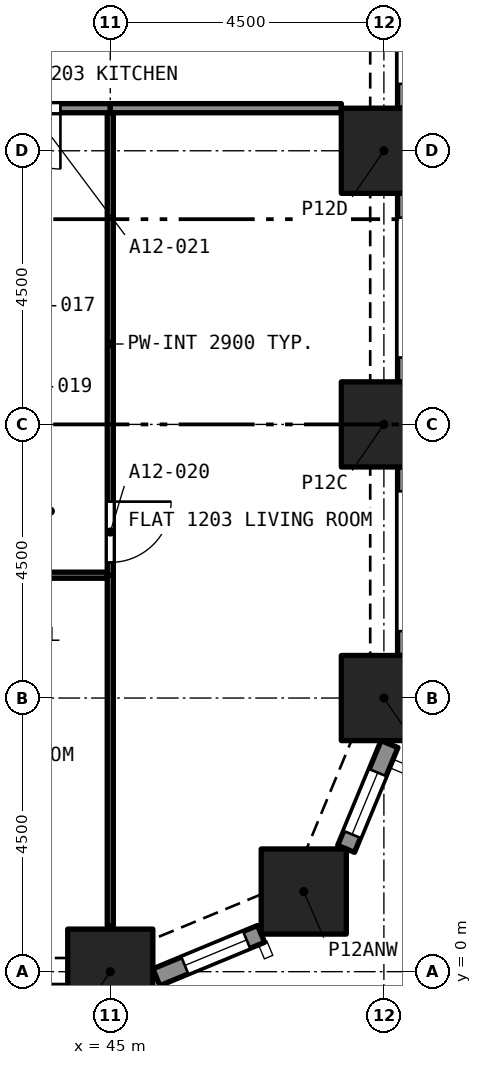
"""IFC4 building model, lengths in metres.
Left out: names, types, materials, properties, quantities, classifications, styles, units other than length and angle.
Written with IfcOpenShell. Run it as: python <this file> out.ifc"""

import sys

from ifc_helpers import new_model, si_unit, direction, frame, frame_2d, origin, origin_2d, place, context, subcontext, project, spatial, rectangle, extrude, element, fill, save


model = new_model("IFC4")
c1 = context("Model", 3, precision=1e-05, world=origin(), true_north=direction((0.0, 1.0)))
c2 = subcontext(c1, "Body", "Model", "MODEL_VIEW")
j1 = project(units=[si_unit("LENGTHUNIT", "METRE"), si_unit("PLANEANGLEUNIT", "RADIAN")], contexts=[c1])
p1 = place(None, origin())
s1 = spatial("IfcSite", under=j1, at=p1, CompositionType="ELEMENT")
p2 = place(p1, origin())
s2 = spatial("IfcBuilding", under=s1, at=p2, CompositionType="ELEMENT")
p3 = place(p2, frame((0.0, 0.0, 49.6)))
s3 = spatial("IfcBuildingStorey", under=s2, at=p3, CompositionType="ELEMENT", Elevation=49.6)
for number, where, z_axis, x_axis in (
    (1, (45.0, 0.0, 0.0), (0.0, 0.0, 1.0), (1.0, 0.0, 0.0)),
    (2, (48.182, 1.318, 0.0), (0.0, 0.0, 1.0), (1.0, 0.0, 0.0)),
    (3, (49.5, 4.5, 0.0), (0.0, 0.0, 1.0), (1.0, 0.0, 0.0)),
    (4, (49.5, 9.0, 0.0), (0.0, 0.0, 1.0), (1.0, 0.0, 0.0)),
    (5, (49.5, 13.5, 0.0), (0.0, 0.0, 1.0), (1.0, 0.0, 0.0)),
):
    element("IfcColumn", number, at=place(p3, frame(where, z_axis=z_axis, x_axis=x_axis)), inside=s3, PredefinedType="COLUMN", context=c2, shape_type="SweptSolid", body=[
        extrude(rectangle(XDim=1.4, YDim=1.4, at=origin_2d()), origin(), (0.0, 0.0, 1.0), 3.2),
    ])
p4 = place(p3, frame((47.48, 0.622, 0.0), z_axis=(0.0, 0.0, 1.0), x_axis=(-0.923903565336, -0.38262540684, 0.0)))
e6 = element("IfcWall", 6, at=p4, inside=s3, PredefinedType="SOLIDWALL", context=c2, shape_type="SweptSolid", body=[
    extrude(rectangle(XDim=1.865, YDim=0.3, at=frame_2d((0.933, 0.0))), origin(), (0.0, 0.0, 1.0), 3.2),
])
p5 = place(p4, frame((0.258, 0.0, 0.45)))
e7 = element("IfcOpeningElement", 7, at=p5, cuts=e6, PredefinedType="OPENING", context=c2, shape_type="SweptSolid", body=[
    extrude(rectangle(XDim=1.1, YDim=1.95, at=frame_2d((0.55, 0.975))), frame((0.0, 0.16, 0.0), z_axis=(0.0, -1.0, 0.0), x_axis=(1.0, 0.0, 0.0)), (0.0, 0.0, 1.0), 0.32),
])
p6 = place(p3, frame((49.592, 3.743, 0.0), z_axis=(0.0, 0.0, 1.0), x_axis=(-0.382737135771, -0.923857286003, 0.0)))
e8 = element("IfcWall", 8, at=p6, inside=s3, PredefinedType="SOLIDWALL", context=c2, shape_type="SweptSolid", body=[
    extrude(rectangle(XDim=1.865, YDim=0.3, at=frame_2d((0.933, 0.0))), origin(), (0.0, 0.0, 1.0), 3.2),
])
p7 = place(p6, frame((0.508, 0.0, 0.45)))
e9 = element("IfcOpeningElement", 9, at=p7, cuts=e8, PredefinedType="OPENING", context=c2, shape_type="SweptSolid", body=[
    extrude(rectangle(XDim=1.1, YDim=1.95, at=frame_2d((0.55, 0.975))), frame((0.0, 0.16, 0.0), z_axis=(0.0, -1.0, 0.0), x_axis=(1.0, 0.0, 0.0)), (0.0, 0.0, 1.0), 0.32),
])
p8 = place(p3, frame((49.875, 8.3, 0.0), z_axis=(0.0, 0.0, 1.0), x_axis=(0.0, -1.0, 0.0)))
e10 = element("IfcWall", 10, at=p8, inside=s3, PredefinedType="SOLIDWALL", context=c2, shape_type="SweptSolid", body=[
    extrude(rectangle(XDim=3.1, YDim=0.3, at=frame_2d((1.55, 0.0))), origin(), (0.0, 0.0, 1.0), 3.2),
])
p9 = place(p8, frame((0.4, 0.0, 0.45)))
e11 = element("IfcOpeningElement", 11, at=p9, cuts=e10, PredefinedType="OPENING", context=c2, shape_type="SweptSolid", body=[
    extrude(rectangle(XDim=2.3, YDim=1.95, at=frame_2d((1.15, 0.975))), frame((0.0, 0.16, 0.0), z_axis=(0.0, -1.0, 0.0), x_axis=(1.0, 0.0, 0.0)), (0.0, 0.0, 1.0), 0.32),
])
p10 = place(p3, frame((49.875, 12.8, 0.0), z_axis=(0.0, 0.0, 1.0), x_axis=(0.0, -1.0, 0.0)))
e12 = element("IfcWall", 12, at=p10, inside=s3, PredefinedType="SOLIDWALL", context=c2, shape_type="SweptSolid", body=[
    extrude(rectangle(XDim=3.1, YDim=0.3, at=frame_2d((1.55, 0.0))), origin(), (0.0, 0.0, 1.0), 3.2),
])
p11 = place(p10, frame((0.4, 0.0, 0.45)))
e13 = element("IfcOpeningElement", 13, at=p11, cuts=e12, PredefinedType="OPENING", context=c2, shape_type="SweptSolid", body=[
    extrude(rectangle(XDim=2.3, YDim=1.95, at=frame_2d((1.15, 0.975))), frame((0.0, 0.16, 0.0), z_axis=(0.0, -1.0, 0.0), x_axis=(1.0, 0.0, 0.0)), (0.0, 0.0, 1.0), 0.32),
])
p12 = place(p3, frame((49.875, 17.3, 0.0), z_axis=(0.0, 0.0, 1.0), x_axis=(0.0, -1.0, 0.0)))
e14 = element("IfcWall", 14, at=p12, inside=s3, PredefinedType="SOLIDWALL", context=c2, shape_type="SweptSolid", body=[
    extrude(rectangle(XDim=3.1, YDim=0.3, at=frame_2d((1.55, 0.0))), origin(), (0.0, 0.0, 1.0), 3.2),
])
p13 = place(p12, frame((0.4, 0.0, 0.45)))
e15 = element("IfcOpeningElement", 15, at=p13, cuts=e14, PredefinedType="OPENING", context=c2, shape_type="SweptSolid", body=[
    extrude(rectangle(XDim=2.3, YDim=1.95, at=frame_2d((1.15, 0.975))), frame((0.0, 0.16, 0.0), z_axis=(0.0, -1.0, 0.0), x_axis=(1.0, 0.0, 0.0)), (0.0, 0.0, 1.0), 0.32),
])
p14 = place(p3, frame((44.95, 6.52, 0.0), z_axis=(0.0, 0.0, 1.0), x_axis=(-1.0, 0.0, 0.0)))
e16 = element("IfcWall", 16, at=p14, inside=s3, PredefinedType="PARTITIONING", context=c2, shape_type="SweptSolid", body=[
    extrude(rectangle(XDim=4.35, YDim=0.1, at=frame_2d((2.175, 0.0))), origin(), (0.0, 0.0, 1.0), 2.9),
])
p15 = place(p14, frame((1.75, 0.0, 0.0)))
e17 = element("IfcOpeningElement", 17, at=p15, cuts=e16, PredefinedType="OPENING", context=c2, shape_type="SweptSolid", body=[
    extrude(rectangle(XDim=0.9, YDim=2.1, at=frame_2d((0.45, 1.05))), frame((0.0, 0.06, 0.0), z_axis=(0.0, -1.0, 0.0), x_axis=(1.0, 0.0, 0.0)), (0.0, 0.0, 1.0), 0.12),
])
p16 = place(p3, frame((45.0, 0.758, 0.0), z_axis=(0.0, 0.0, 1.0), x_axis=(0.0, 1.0, 0.0)))
e18 = element("IfcWall", 18, at=p16, inside=s3, PredefinedType="PARTITIONING", context=c2, shape_type="SweptSolid", body=[
    extrude(rectangle(XDim=5.762, YDim=0.1, at=frame_2d((2.881, 0.0))), origin(), (0.0, 0.0, 1.0), 2.9),
])
p17 = place(p3, frame((45.0, 14.125, 0.0), z_axis=(0.0, 0.0, 1.0), x_axis=(0.0, -1.0, 0.0)))
e19 = element("IfcWall", 19, at=p17, inside=s3, PredefinedType="PARTITIONING", context=c2, shape_type="SweptSolid", body=[
    extrude(rectangle(XDim=7.605, YDim=0.1, at=frame_2d((3.802, 0.0))), origin(), (0.0, 0.0, 1.0), 2.9),
])
p18 = place(p17, frame((6.395, 0.0, 0.0)))
e20 = element("IfcOpeningElement", 20, at=p18, cuts=e19, PredefinedType="OPENING", context=c2, shape_type="SweptSolid", body=[
    extrude(rectangle(XDim=1.0, YDim=2.1, at=frame_2d((0.5, 1.05))), frame((0.0, 0.06, 0.0), z_axis=(0.0, -1.0, 0.0), x_axis=(1.0, 0.0, 0.0)), (0.0, 0.0, 1.0), 0.12),
])
p19 = place(p3, frame((45.0, 14.2, 0.0), z_axis=(0.0, 0.0, 1.0), x_axis=(-1.0, 0.0, 0.0)))
e21 = element("IfcWall", 21, at=p19, inside=s3, PredefinedType="PARTITIONING", context=c2, shape_type="SweptSolid", body=[
    extrude(rectangle(XDim=1.95, YDim=0.15, at=frame_2d((0.975, 0.0))), origin(), (0.0, 0.0, 1.0), 2.9),
])
p20 = place(p19, frame((0.82, 0.0, 0.0)))
e22 = element("IfcOpeningElement", 22, at=p20, cuts=e21, PredefinedType="OPENING", context=c2, shape_type="SweptSolid", body=[
    extrude(rectangle(XDim=1.0, YDim=2.1, at=frame_2d((0.5, 1.05))), frame((0.0, 0.085, 0.0), z_axis=(0.0, -1.0, 0.0), x_axis=(1.0, 0.0, 0.0)), (0.0, 0.0, 1.0), 0.17),
])
p21 = place(p3, frame((45.0, 14.2, 0.0), z_axis=(0.0, 0.0, 1.0), x_axis=(1.0, 0.0, 0.0)))
e23 = element("IfcWall", 23, at=p21, inside=s3, PredefinedType="PARTITIONING", context=c2, shape_type="SweptSolid", body=[
    extrude(rectangle(XDim=3.8, YDim=0.15, at=frame_2d((1.9, 0.0))), origin(), (0.0, 0.0, 1.0), 2.9),
])
p22 = place(p5, origin())
e24 = element("IfcWindow", 24, at=p22, inside=s3, PartitioningType="SINGLE_PANEL", PredefinedType="WINDOW", context=c2, shape_type="SweptSolid", body=[
    extrude(rectangle(XDim=1.1, YDim=1.95, at=frame_2d((0.55, 0.975))), frame((0.0, 0.03, 0.0), z_axis=(0.0, -1.0, 0.0), x_axis=(1.0, 0.0, 0.0)), (0.0, 0.0, 1.0), 0.06),
])
fill(e7, e24)
p23 = place(p7, origin())
e25 = element("IfcWindow", 25, at=p23, inside=s3, PartitioningType="SINGLE_PANEL", PredefinedType="WINDOW", context=c2, shape_type="SweptSolid", body=[
    extrude(rectangle(XDim=1.1, YDim=1.95, at=frame_2d((0.55, 0.975))), frame((0.0, 0.03, 0.0), z_axis=(0.0, -1.0, 0.0), x_axis=(1.0, 0.0, 0.0)), (0.0, 0.0, 1.0), 0.06),
])
fill(e9, e25)
p24 = place(p18, origin())
e26 = element("IfcDoor", 26, at=p24, inside=s3, OperationType="SINGLE_SWING_RIGHT", PredefinedType="DOOR", context=c2, shape_type="SweptSolid", body=[
    extrude(rectangle(XDim=1.0, YDim=2.1, at=frame_2d((0.5, 1.05))), frame((0.0, 0.025, 0.0), z_axis=(0.0, -1.0, 0.0), x_axis=(1.0, 0.0, 0.0)), (0.0, 0.0, 1.0), 0.05),
])
fill(e20, e26)
p25 = place(p20, origin())
e27 = element("IfcDoor", 27, at=p25, inside=s3, OperationType="SINGLE_SWING_RIGHT", PredefinedType="DOOR", context=c2, shape_type="SweptSolid", body=[
    extrude(rectangle(XDim=1.0, YDim=2.1, at=frame_2d((0.5, 1.05))), frame((0.0, 0.025, 0.0), z_axis=(0.0, -1.0, 0.0), x_axis=(1.0, 0.0, 0.0)), (0.0, 0.0, 1.0), 0.05),
])
fill(e22, e27)
save(model, sys.argv[1])
